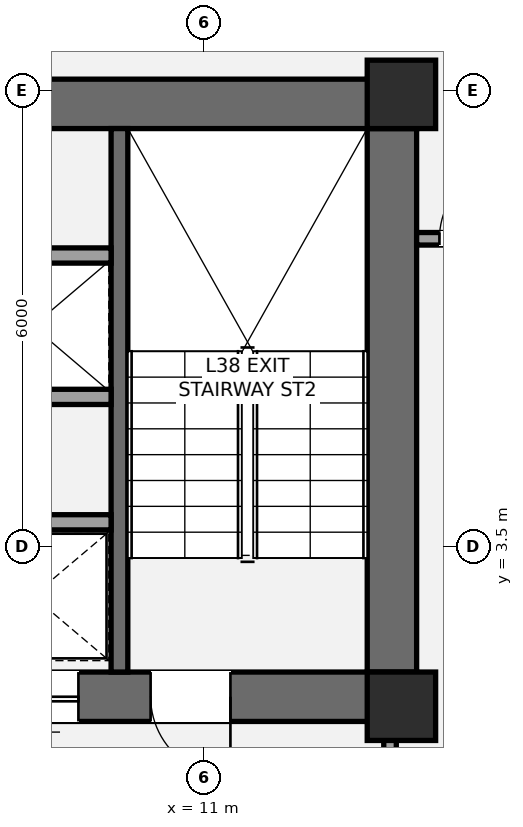
"""IFC4 building model, lengths in metres.
Left out: names, types, materials, properties, quantities, classifications, styles, units other than length and angle.
Written with IfcOpenShell. Run it as: python <this file> out.ifc"""

import sys

from ifc_helpers import new_model, si_unit, direction, frame, frame_2d, origin, origin_2d, place, context, subcontext, project, spatial, rectangle, extrude, element, fill, save


model = new_model("IFC4")
c1 = context("Model", 3, precision=1e-05, world=origin(), true_north=direction((0.0, 1.0)))
c2 = subcontext(c1, "Body", "Model", "MODEL_VIEW")
j1 = project(units=[si_unit("LENGTHUNIT", "METRE"), si_unit("PLANEANGLEUNIT", "RADIAN")], contexts=[c1])
p1 = place(None, origin())
s1 = spatial("IfcSite", under=j1, at=p1, CompositionType="ELEMENT")
p2 = place(p1, origin())
s2 = spatial("IfcBuilding", under=s1, at=p2, CompositionType="ELEMENT")
p3 = place(p2, frame((0.0, 0.0, 143.8)))
s3 = spatial("IfcBuildingStorey", under=s2, at=p3, CompositionType="ELEMENT", Elevation=143.8)
p4 = place(p3, frame((13.475, 1.2, 0.0), z_axis=(0.0, 0.0, 1.0), x_axis=(0.0, 1.0, 0.0)))
e1 = element("IfcWall", 1, at=p4, inside=s3, PredefinedType="SHEAR", context=c2, shape_type="SweptSolid", body=[
    extrude(rectangle(XDim=8.45, YDim=0.65, at=frame_2d((4.225, 0.0))), origin(), (0.0, 0.0, 1.0), 3.2),
])
p5 = place(p3, frame((4.475, 9.325, 0.0), z_axis=(0.0, 0.0, 1.0), x_axis=(1.0, 0.0, 0.0)))
e2 = element("IfcWall", 2, at=p5, inside=s3, PredefinedType="SHEAR", context=c2, shape_type="SweptSolid", body=[
    extrude(rectangle(XDim=9.325, YDim=0.65, at=frame_2d((4.663, 0.0))), origin(), (0.0, 0.0, 1.0), 3.2),
])
p6 = place(p3, frame((13.8, 1.525, 0.0), z_axis=(0.0, 0.0, 1.0), x_axis=(-1.0, 0.0, 0.0)))
e3 = element("IfcWall", 3, at=p6, inside=s3, PredefinedType="SHEAR", context=c2, shape_type="SweptSolid", body=[
    extrude(rectangle(XDim=8.925, YDim=0.65, at=frame_2d((4.462, 0.0))), origin(), (0.0, 0.0, 1.0), 3.2),
])
p7 = place(p6, frame((2.45, 0.0, 0.0)))
e4 = element("IfcOpeningElement", 4, at=p7, cuts=e3, PredefinedType="OPENING", context=c2, shape_type="SweptSolid", body=[
    extrude(rectangle(XDim=1.05, YDim=2.15, at=frame_2d((0.525, 1.075))), frame((0.0, 0.335, 0.0), z_axis=(0.0, -1.0, 0.0), x_axis=(1.0, 0.0, 0.0)), (0.0, 0.0, 1.0), 0.67),
])
p8 = place(p6, frame((4.45, 0.0, 0.0)))
e5 = element("IfcOpeningElement", 5, at=p8, cuts=e3, PredefinedType="OPENING", context=c2, shape_type="SweptSolid", body=[
    extrude(rectangle(XDim=1.1, YDim=2.2, at=frame_2d((0.55, 1.1))), frame((0.0, 0.335, 0.0), z_axis=(0.0, -1.0, 0.0), x_axis=(1.0, 0.0, 0.0)), (0.0, 0.0, 1.0), 0.67),
])
p9 = place(p3, frame((9.89, 1.85, 0.0), z_axis=(0.0, 0.0, 1.0), x_axis=(0.0, 1.0, 0.0)))
e6 = element("IfcWall", 6, at=p9, inside=s3, PredefinedType="SHEAR", context=c2, shape_type="SweptSolid", body=[
    extrude(rectangle(XDim=7.15, YDim=0.22, at=frame_2d((3.575, 0.0))), origin(), (0.0, 0.0, 1.0), 3.2),
])
for number, where, z_axis, x_axis in (
    (7, (13.6, 1.4, 0.0), (0.0, 0.0, 1.0), (1.0, 0.0, 0.0)),
    (8, (13.6, 9.45, 0.0), (0.0, 0.0, 1.0), (1.0, 0.0, 0.0)),
):
    element("IfcColumn", number, at=place(p3, frame(where, z_axis=z_axis, x_axis=x_axis)), inside=s3, PredefinedType="COLUMN", context=c2, shape_type="SweptSolid", body=[
        extrude(rectangle(XDim=0.9, YDim=0.9, at=origin_2d()), origin(), (0.0, 0.0, 1.0), 3.2),
    ])
p10 = place(p3, frame((13.45, -2.15, 0.0), z_axis=(0.0, 0.0, 1.0), x_axis=(0.0, 1.0, 0.0)))
e9 = element("IfcWall", 9, at=p10, inside=s3, PredefinedType="PARTITIONING", context=c2, shape_type="SweptSolid", body=[
    extrude(rectangle(XDim=3.4, YDim=0.165, at=frame_2d((1.7, 0.0))), origin(), (0.0, 0.0, 1.0), 2.473),
])
p11 = place(p10, frame((1.15, 0.0, 0.0)))
e10 = element("IfcOpeningElement", 10, at=p11, cuts=e9, PredefinedType="OPENING", context=c2, shape_type="SweptSolid", body=[
    extrude(rectangle(XDim=1.05, YDim=2.15, at=frame_2d((0.525, 1.075))), frame((0.0, 0.093, 0.0), z_axis=(0.0, -1.0, 0.0), x_axis=(1.0, 0.0, 0.0)), (0.0, 0.0, 1.0), 0.185),
])
p12 = place(p3, frame((5.525, 3.82, 0.0), z_axis=(0.0, 0.0, 1.0), x_axis=(1.0, 0.0, 0.0)))
e11 = element("IfcWall", 11, at=p12, inside=s3, PredefinedType="SOLIDWALL", context=c2, shape_type="SweptSolid", body=[
    extrude(rectangle(XDim=4.255, YDim=0.2, at=frame_2d((2.127, 0.0))), origin(), (0.0, 0.0, 1.0), 3.02),
])
p13 = place(p12, frame((0.65, 0.0, 0.0)))
e12 = element("IfcOpeningElement", 12, at=p13, cuts=e11, PredefinedType="OPENING", context=c2, shape_type="SweptSolid", body=[
    extrude(rectangle(XDim=1.2, YDim=2.2, at=frame_2d((0.6, 1.1))), frame((0.0, 0.11, 0.0), z_axis=(0.0, -1.0, 0.0), x_axis=(1.0, 0.0, 0.0)), (0.0, 0.0, 1.0), 0.22),
])
for number, where, z_axis, x_axis in (
    (13, (5.525, 5.47, 0.0), (0.0, 0.0, 1.0), (1.0, 0.0, 0.0)),
    (14, (5.525, 7.33, 0.0), (0.0, 0.0, 1.0), (1.0, 0.0, 0.0)),
):
    element("IfcWall", number, at=place(p3, frame(where, z_axis=z_axis, x_axis=x_axis)), inside=s3, PredefinedType="SOLIDWALL", context=c2, shape_type="SweptSolid", body=[
        extrude(rectangle(XDim=4.255, YDim=0.2, at=frame_2d((2.127, 0.0))), origin(), (0.0, 0.0, 1.0), 3.02),
    ])
p14 = place(p3, frame((13.8, 7.55, 0.0), z_axis=(0.0, 0.0, 1.0), x_axis=(1.0, 0.0, 0.0)))
e15 = element("IfcWall", 15, at=p14, inside=s3, PredefinedType="PARTITIONING", context=c2, shape_type="SweptSolid", body=[
    extrude(rectangle(XDim=1.75, YDim=0.165, at=frame_2d((0.875, 0.0))), origin(), (0.0, 0.0, 1.0), 2.473),
])
p15 = place(p14, frame((0.3, 0.0, 0.0)))
e16 = element("IfcOpeningElement", 16, at=p15, cuts=e15, PredefinedType="OPENING", context=c2, shape_type="SweptSolid", body=[
    extrude(rectangle(XDim=1.0, YDim=2.15, at=frame_2d((0.5, 1.075))), frame((0.0, 0.093, 0.0), z_axis=(0.0, -1.0, 0.0), x_axis=(1.0, 0.0, 0.0)), (0.0, 0.0, 1.0), 0.185),
])
p16 = place(p7, origin())
e17 = element("IfcDoor", 17, at=p16, inside=s3, OperationType="SINGLE_SWING_LEFT", PredefinedType="DOOR", context=c2, shape_type="SweptSolid", body=[
    extrude(rectangle(XDim=1.05, YDim=2.15, at=frame_2d((0.525, 1.075))), frame((0.0, 0.025, 0.0), z_axis=(0.0, -1.0, 0.0), x_axis=(1.0, 0.0, 0.0)), (0.0, 0.0, 1.0), 0.05),
])
fill(e4, e17)
p17 = place(p8, origin())
e18 = element("IfcDoor", 18, at=p17, inside=s3, OperationType="SLIDING_TO_LEFT", PredefinedType="DOOR", context=c2, shape_type="SweptSolid", body=[
    extrude(rectangle(XDim=1.1, YDim=2.2, at=frame_2d((0.55, 1.1))), frame((0.0, 0.025, 0.0), z_axis=(0.0, -1.0, 0.0), x_axis=(1.0, 0.0, 0.0)), (0.0, 0.0, 1.0), 0.05),
])
fill(e5, e18)
p18 = place(p15, origin())
e19 = element("IfcDoor", 19, at=p18, inside=s3, OperationType="SINGLE_SWING_RIGHT", PredefinedType="DOOR", context=c2, shape_type="SweptSolid", body=[
    extrude(rectangle(XDim=1.0, YDim=2.15, at=frame_2d((0.5, 1.075))), frame((0.0, 0.025, 0.0), z_axis=(0.0, -1.0, 0.0), x_axis=(1.0, 0.0, 0.0)), (0.0, 0.0, 1.0), 0.05),
])
fill(e16, e19)
save(model, sys.argv[1])
